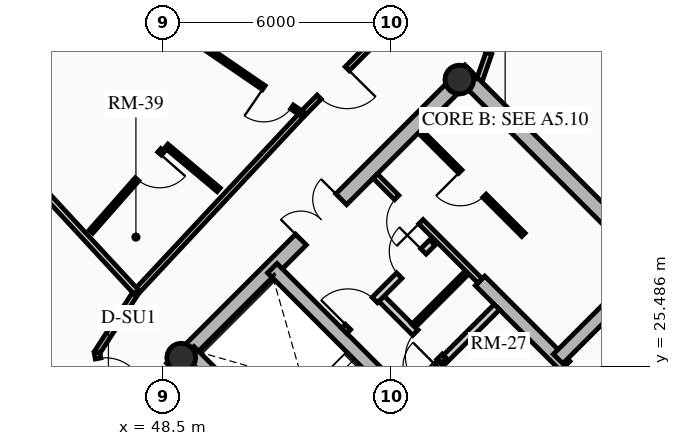
"""IFC4 building model, lengths in metres.
Left out: names, types, materials, properties, quantities, classifications, styles, units other than length and angle.
Written with IfcOpenShell. Run it as: python <this file> out.ifc"""

import sys

from ifc_helpers import new_model, si_unit, direction, frame, frame_2d, origin, origin_2d, place, context, subcontext, project, spatial, rectangle, hollow_circle, extrude, source, transform, mapped, element, fill, save


model = new_model("IFC4")
c1 = context("Model", 3, precision=1e-05, world=origin(), true_north=direction((0.0, 1.0)))
c2 = subcontext(c1, "Body", "Model", "MODEL_VIEW")
j1 = project(units=[si_unit("LENGTHUNIT", "METRE"), si_unit("PLANEANGLEUNIT", "RADIAN")], contexts=[c1])
p1 = place(None, origin())
s1 = spatial("IfcSite", under=j1, at=p1, CompositionType="ELEMENT")
p2 = place(p1, origin())
s2 = spatial("IfcBuilding", under=s1, at=p2, CompositionType="ELEMENT")
p3 = place(p2, frame((0.0, 0.0, 154.51)))
s3 = spatial("IfcBuildingStorey", under=s2, at=p3, CompositionType="ELEMENT", Elevation=154.51)
for number, where, z_axis, x_axis in (
    (1, (58.702, 15.732, 0.0), (0.0, 0.0, 1.0), (-0.707, 0.707, 0.0)),
    (2, (66.268, 23.298, 0.0), (0.0, 0.0, 1.0), (-0.707, 0.707, 0.0)),
):
    element("IfcWall", number, at=place(p3, frame(where, z_axis=z_axis, x_axis=x_axis)), inside=s3, PredefinedType="SHEAR", context=c2, shape_type="SweptSolid", body=[
        extrude(rectangle(XDim=14.1, YDim=0.4, at=frame_2d((7.05, 0.0))), origin(), (0.0, 0.0, 1.0), 2.91),
    ])
p4 = place(p3, frame((48.873, 25.561, 0.0), z_axis=(0.0, 0.0, 1.0), x_axis=(0.707106781187, 0.707106781187, 0.0)))
e3 = element("IfcWall", 3, at=p4, inside=s3, PredefinedType="SHEAR", context=c2, shape_type="SweptSolid", body=[
    extrude(rectangle(XDim=10.7, YDim=0.4, at=frame_2d((5.35, 0.0))), origin(), (0.0, 0.0, 1.0), 2.91),
])
m1 = source(origin(), c2, "Body", "SweptSolid", [
    extrude(rectangle(XDim=1.5, YDim=2.02, at=frame_2d((0.75, 1.01))), frame((0.0, 0.21, 0.0), z_axis=(0.0, -1.0, 0.0), x_axis=(1.0, 0.0, 0.0)), (0.0, 0.0, 1.0), 0.42),
])
p5 = place(p4, frame((4.6, 0.0, 0.0)))
e4 = element("IfcOpeningElement", 4, at=p5, cuts=e3, PredefinedType="OPENING", context=c2, shape_type="MappedRepresentation", body=[
    mapped(m1, transform((0.0, 0.0, 0.0), x_axis=(1.0, 0.0, 0.0), y_axis=(0.0, 1.0, 0.0), z_axis=(0.0, 0.0, 1.0), scale=1.0)),
])
p6 = place(p3, frame((61.06, 18.373, 0.0), z_axis=(0.0, 0.0, 1.0), x_axis=(-0.707106781187, 0.707106781187, 0.0)))
e5 = element("IfcWall", 5, at=p6, inside=s3, PredefinedType="SHEAR", context=c2, shape_type="SweptSolid", body=[
    extrude(rectangle(XDim=13.7, YDim=0.35, at=frame_2d((6.85, 0.0))), origin(), (0.0, 0.0, 1.0), 2.91),
])
m2 = source(origin(), c2, "Body", "SweptSolid", [
    extrude(rectangle(XDim=1.1, YDim=2.015, at=frame_2d((0.55, 1.007))), frame((0.0, 0.185, 0.0), z_axis=(0.0, -1.0, 0.0), x_axis=(1.0, 0.0, 0.0)), (0.0, 0.0, 1.0), 0.37),
])
p7 = place(p6, frame((4.85, 0.0, 0.0)))
e6 = element("IfcOpeningElement", 6, at=p7, cuts=e5, PredefinedType="OPENING", context=c2, shape_type="MappedRepresentation", body=[
    mapped(m2, transform((0.0, 0.0, 0.0), x_axis=(1.0, 0.0, 0.0), y_axis=(0.0, 1.0, 0.0), z_axis=(0.0, 0.0, 1.0), scale=1.0)),
])
p8 = place(p6, frame((0.625, 0.0, 0.0)))
e7 = element("IfcOpeningElement", 7, at=p8, cuts=e5, PredefinedType="OPENING", context=c2, shape_type="MappedRepresentation", body=[
    mapped(m2, transform((0.0, 0.0, 0.0), x_axis=(1.0, 0.0, 0.0), y_axis=(0.0, 1.0, 0.0), z_axis=(0.0, 0.0, 1.0), scale=1.0)),
])
p9 = place(p6, frame((2.625, 0.0, 0.0)))
e8 = element("IfcOpeningElement", 8, at=p9, cuts=e5, PredefinedType="OPENING", context=c2, shape_type="MappedRepresentation", body=[
    mapped(m2, transform((0.0, 0.0, 0.0), x_axis=(1.0, 0.0, 0.0), y_axis=(0.0, 1.0, 0.0), z_axis=(0.0, 0.0, 1.0), scale=1.0)),
])
m3 = source(origin(), c2, "Body", "SweptSolid", [
    extrude(rectangle(XDim=1.15, YDim=2.02, at=frame_2d((0.575, 1.01))), frame((0.0, 0.185, 0.0), z_axis=(0.0, -1.0, 0.0), x_axis=(1.0, 0.0, 0.0)), (0.0, 0.0, 1.0), 0.37),
])
p10 = place(p6, frame((7.27, 0.0, 0.0)))
e9 = element("IfcOpeningElement", 9, at=p10, cuts=e5, PredefinedType="OPENING", context=c2, shape_type="MappedRepresentation", body=[
    mapped(m3, transform((0.0, 0.0, 0.0), x_axis=(1.0, 0.0, 0.0), y_axis=(0.0, 1.0, 0.0), z_axis=(0.0, 0.0, 1.0), scale=1.0)),
])
p11 = place(p3, frame((63.627, 20.94, 0.0), z_axis=(0.0, 0.0, 1.0), x_axis=(-0.707119496762, 0.707094065383, 0.0)))
e10 = element("IfcWall", 10, at=p11, inside=s3, PredefinedType="SHEAR", context=c2, shape_type="SweptSolid", body=[
    extrude(rectangle(XDim=9.6, YDim=0.35, at=frame_2d((4.8, 0.0))), origin(), (0.0, 0.0, 1.0), 2.91),
])
p12 = place(p11, frame((5.28, 0.0, 0.0)))
e11 = element("IfcOpeningElement", 11, at=p12, cuts=e10, PredefinedType="OPENING", context=c2, shape_type="MappedRepresentation", body=[
    mapped(m3, transform((0.0, 0.0, 0.0), x_axis=(1.0, 0.0, 0.0), y_axis=(0.0, 1.0, 0.0), z_axis=(0.0, 0.0, 1.0), scale=1.0)),
])
p13 = place(p3, frame((53.922, 21.141, 0.0), z_axis=(0.0, 0.0, 1.0), x_axis=(-0.707106781187, 0.707106781187, 0.0)))
e12 = element("IfcWall", 12, at=p13, inside=s3, PredefinedType="SHEAR", context=c2, shape_type="SweptSolid", body=[
    extrude(rectangle(XDim=6.695, YDim=0.35, at=frame_2d((3.348, 0.0))), origin(), (0.0, 0.0, 1.0), 2.91),
])
p14 = place(p3, frame((58.893, 25.674, 0.0), z_axis=(0.0, 0.0, 1.0), x_axis=(0.707106781187, 0.707106781187, 0.0)))
e13 = element("IfcWall", 13, at=p14, inside=s3, PredefinedType="SHEAR", context=c2, shape_type="SweptSolid", body=[
    extrude(rectangle(XDim=3.285, YDim=0.35, at=frame_2d((1.643, 0.0))), origin(), (0.0, 0.0, 1.0), 2.91),
])
for number, where, z_axis, x_axis in (
    (14, (48.976, 25.706, 0.0), (0.0, 0.0, 1.0), (0.707, 0.707, 0.0)),
    (15, (56.294, 33.024, 0.0), (0.0, 0.0, 1.0), (0.707, 0.707, 0.0)),
):
    element("IfcColumn", number, at=place(p3, frame(where, z_axis=z_axis, x_axis=x_axis)), inside=s3, PredefinedType="COLUMN", context=c2, shape_type="SweptSolid", body=[
        extrude(hollow_circle(Radius=0.38, WallThickness=0.032, at=origin_2d()), origin(), (0.0, 0.0, 1.0), 2.91),
    ])
p15 = place(p3, frame((54.961, 24.719, 0.0), z_axis=(0.0, 0.0, 1.0), x_axis=(0.707106781187, 0.707106781187, 0.0)))
e16 = element("IfcWall", 16, at=p15, inside=s3, PredefinedType="PARTITIONING", context=c2, shape_type="SweptSolid", body=[
    extrude(rectangle(XDim=3.28, YDim=0.2, at=frame_2d((1.64, 0.0))), origin(), (0.0, 0.0, 1.0), 2.675),
])
m4 = source(origin(), c2, "Body", "SweptSolid", [
    extrude(rectangle(XDim=0.9, YDim=2.005, at=frame_2d((0.45, 1.002))), frame((0.0, 0.11, 0.0), z_axis=(0.0, -1.0, 0.0), x_axis=(1.0, 0.0, 0.0)), (0.0, 0.0, 1.0), 0.22),
])
p16 = place(p15, frame((0.16, 0.0, 0.0)))
e17 = element("IfcOpeningElement", 17, at=p16, cuts=e16, PredefinedType="OPENING", context=c2, shape_type="MappedRepresentation", body=[
    mapped(m4, transform((0.0, 0.0, 0.0), x_axis=(1.0, 0.0, 0.0), y_axis=(0.0, 1.0, 0.0), z_axis=(0.0, 0.0, 1.0), scale=1.0)),
])
p17 = place(p3, frame((55.874, 25.631, 0.0), z_axis=(0.0, 0.0, 1.0), x_axis=(-0.707157639372, 0.707055919343, 0.0)))
e18 = element("IfcWall", 18, at=p17, inside=s3, PredefinedType="PARTITIONING", context=c2, shape_type="SweptSolid", body=[
    extrude(rectangle(XDim=2.4, YDim=0.2, at=frame_2d((1.2, 0.0))), origin(), (0.0, 0.0, 1.0), 2.675),
])
p18 = place(p17, frame((0.14, 0.0, 0.0)))
e19 = element("IfcOpeningElement", 19, at=p18, cuts=e18, PredefinedType="OPENING", context=c2, shape_type="MappedRepresentation", body=[
    mapped(m4, transform((0.0, 0.0, 0.0), x_axis=(1.0, 0.0, 0.0), y_axis=(0.0, 1.0, 0.0), z_axis=(0.0, 0.0, 1.0), scale=1.0)),
])
p19 = place(p3, frame((53.264, 26.416, 0.0), z_axis=(0.0, 0.0, 1.0), x_axis=(0.707106781187, 0.707106781187, 0.0)))
e20 = element("IfcWall", 20, at=p19, inside=s3, PredefinedType="PARTITIONING", context=c2, shape_type="SweptSolid", body=[
    extrude(rectangle(XDim=3.28, YDim=0.2, at=frame_2d((1.64, 0.0))), origin(), (0.0, 0.0, 1.0), 2.675),
])
m5 = source(origin(), c2, "Body", "SweptSolid", [
    extrude(rectangle(XDim=1.0, YDim=2.015, at=frame_2d((0.5, 1.007))), frame((0.0, 0.11, 0.0), z_axis=(0.0, -1.0, 0.0), x_axis=(1.0, 0.0, 0.0)), (0.0, 0.0, 1.0), 0.22),
])
p20 = place(p19, frame((0.14, 0.0, 0.0)))
e21 = element("IfcOpeningElement", 21, at=p20, cuts=e20, PredefinedType="OPENING", context=c2, shape_type="MappedRepresentation", body=[
    mapped(m5, transform((0.0, 0.0, 0.0), x_axis=(1.0, 0.0, 0.0), y_axis=(0.0, 1.0, 0.0), z_axis=(0.0, 0.0, 1.0), scale=1.0)),
])
p21 = place(p19, frame((2.05, 0.0, 0.0)))
e22 = element("IfcOpeningElement", 22, at=p21, cuts=e20, PredefinedType="OPENING", context=c2, shape_type="MappedRepresentation", body=[
    mapped(m4, transform((0.0, 0.0, 0.0), x_axis=(1.0, 0.0, 0.0), y_axis=(0.0, 1.0, 0.0), z_axis=(0.0, 0.0, 1.0), scale=1.0)),
])
p22 = place(p3, frame((55.089, 26.543, 0.0), z_axis=(0.0, 0.0, 1.0), x_axis=(0.707106781187, 0.707106781187, 0.0)))
e23 = element("IfcWall", 23, at=p22, inside=s3, PredefinedType="PARTITIONING", context=c2, shape_type="SweptSolid", body=[
    extrude(rectangle(XDim=1.88, YDim=0.125, at=frame_2d((0.94, 0.0))), origin(), (0.0, 0.0, 1.0), 2.675),
])
p23 = place(p3, frame((56.839, 27.728, 0.0), z_axis=(0.0, 0.0, 1.0), x_axis=(-0.707106781187, 0.707106781187, 0.0)))
e24 = element("IfcWall", 24, at=p23, inside=s3, PredefinedType="PARTITIONING", context=c2, shape_type="SweptSolid", body=[
    extrude(rectangle(XDim=3.9, YDim=0.16, at=frame_2d((1.95, 0.0))), origin(), (0.0, 0.0, 1.0), 2.675),
])
m6 = source(origin(), c2, "Body", "SweptSolid", [
    extrude(rectangle(XDim=0.9, YDim=2.005, at=frame_2d((0.45, 1.002))), frame((0.0, 0.09, 0.0), z_axis=(0.0, -1.0, 0.0), x_axis=(1.0, 0.0, 0.0)), (0.0, 0.0, 1.0), 0.18),
])
p24 = place(p23, frame((2.2, 0.0, 0.0)))
e25 = element("IfcOpeningElement", 25, at=p24, cuts=e24, PredefinedType="OPENING", context=c2, shape_type="MappedRepresentation", body=[
    mapped(m6, transform((0.0, 0.0, 0.0), x_axis=(1.0, 0.0, 0.0), y_axis=(0.0, 1.0, 0.0), z_axis=(0.0, 0.0, 1.0), scale=1.0)),
])
p25 = place(p3, frame((57.981, 28.941, 0.0), z_axis=(0.0, 0.0, 1.0), x_axis=(-0.707074823725, 0.707138737204, 0.0)))
e26 = element("IfcWall", 26, at=p25, inside=s3, PredefinedType="PARTITIONING", context=c2, shape_type="SweptSolid", body=[
    extrude(rectangle(XDim=3.82, YDim=0.125, at=frame_2d((1.91, 0.0))), origin(), (0.0, 0.0, 1.0), 2.675),
])
m7 = source(origin(), c2, "Body", "SweptSolid", [
    extrude(rectangle(XDim=0.9, YDim=2.005, at=frame_2d((0.45, 1.002))), frame((0.0, 0.073, 0.0), z_axis=(0.0, -1.0, 0.0), x_axis=(1.0, 0.0, 0.0)), (0.0, 0.0, 1.0), 0.145),
])
p26 = place(p25, frame((1.45, 0.0, 0.0)))
e27 = element("IfcOpeningElement", 27, at=p26, cuts=e26, PredefinedType="OPENING", context=c2, shape_type="MappedRepresentation", body=[
    mapped(m7, transform((0.0, 0.0, 0.0), x_axis=(1.0, 0.0, 0.0), y_axis=(0.0, 1.0, 0.0), z_axis=(0.0, 0.0, 1.0), scale=1.0)),
])
p27 = place(p3, frame((54.501, 34.479, 0.0), z_axis=(0.0, 0.0, 1.0), x_axis=(-0.70346073929, -0.710734119258, 0.0)))
e28 = element("IfcWall", 28, at=p27, inside=s3, PredefinedType="PARTITIONING", context=c2, shape_type="SweptSolid", body=[
    extrude(rectangle(XDim=3.323, YDim=0.15, at=frame_2d((1.662, 0.0))), origin(), (0.0, 0.0, 1.0), 2.245),
])
m8 = source(origin(), c2, "Body", "SweptSolid", [
    extrude(rectangle(XDim=1.05, YDim=2.015, at=frame_2d((0.525, 1.007))), frame((0.0, 0.085, 0.0), z_axis=(0.0, -1.0, 0.0), x_axis=(1.0, 0.0, 0.0)), (0.0, 0.0, 1.0), 0.17),
])
p28 = place(p27, frame((1.645, 0.0, 0.0)))
e29 = element("IfcOpeningElement", 29, at=p28, cuts=e28, PredefinedType="OPENING", context=c2, shape_type="MappedRepresentation", body=[
    mapped(m8, transform((0.0, 0.0, 0.0), x_axis=(1.0, 0.0, 0.0), y_axis=(0.0, 1.0, 0.0), z_axis=(0.0, 0.0, 1.0), scale=1.0)),
])
p29 = place(p3, frame((52.163, 32.117, 0.0), z_axis=(0.0, 0.0, 1.0), x_axis=(-0.682485296115, -0.730899323154, 0.0)))
e30 = element("IfcWall", 30, at=p29, inside=s3, PredefinedType="PARTITIONING", context=c2, shape_type="SweptSolid", body=[
    extrude(rectangle(XDim=6.404, YDim=0.15, at=frame_2d((3.202, 0.0))), origin(), (0.0, 0.0, 1.0), 2.245),
])
p30 = place(p3, frame((47.792, 27.436, 0.0), z_axis=(0.0, 0.0, 1.0), x_axis=(-0.543086162542, -0.839676973637, 0.0)))
e31 = element("IfcWall", 31, at=p30, inside=s3, PredefinedType="PARTITIONING", context=c2, shape_type="SweptSolid", body=[
    extrude(rectangle(XDim=1.901, YDim=0.15, at=frame_2d((0.95, 0.0))), origin(), (0.0, 0.0, 1.0), 2.245),
])
p31 = place(p3, frame((46.76, 25.84, 0.0), z_axis=(0.0, 0.0, 1.0), x_axis=(0.181230731673, -0.983440604153, 0.0)))
e32 = element("IfcWall", 32, at=p31, inside=s3, PredefinedType="PARTITIONING", context=c2, shape_type="SweptSolid", body=[
    extrude(rectangle(XDim=1.365, YDim=0.15, at=frame_2d((0.682, 0.0))), origin(), (0.0, 0.0, 1.0), 2.245),
])
p32 = place(p31, frame((0.157, 0.0, 0.0)))
e33 = element("IfcOpeningElement", 33, at=p32, cuts=e32, PredefinedType="OPENING", context=c2, shape_type="MappedRepresentation", body=[
    mapped(m8, transform((0.0, 0.0, 0.0), x_axis=(1.0, 0.0, 0.0), y_axis=(0.0, 1.0, 0.0), z_axis=(0.0, 0.0, 1.0), scale=1.0)),
])
p33 = place(p3, frame((47.792, 27.436, 0.0), z_axis=(0.0, 0.0, 1.0), x_axis=(-0.679077160958, 0.734066897132, 0.0)))
e34 = element("IfcWall", 34, at=p33, inside=s3, PredefinedType="PARTITIONING", context=c2, shape_type="SweptSolid", body=[
    extrude(rectangle(XDim=7.947, YDim=0.16, at=frame_2d((3.974, 0.0))), origin(), (0.0, 0.0, 1.0), 2.245),
])
p34 = place(p3, frame((56.828, 33.021, 0.0), z_axis=(0.0, 0.0, 1.0), x_axis=(0.328682472103, 0.944440486496, 0.0)))
e35 = element("IfcWall", 35, at=p34, inside=s3, PredefinedType="PARTITIONING", context=c2, shape_type="SweptSolid", body=[
    extrude(rectangle(XDim=1.989, YDim=0.16, at=frame_2d((0.995, 0.0))), origin(), (0.0, 0.0, 1.0), 2.245),
])
m9 = source(origin(), c2, "Body", "SweptSolid", [
    extrude(rectangle(XDim=1.05, YDim=2.015, at=frame_2d((0.525, 1.007))), frame((0.0, 0.09, 0.0), z_axis=(0.0, -1.0, 0.0), x_axis=(1.0, 0.0, 0.0)), (0.0, 0.0, 1.0), 0.18),
])
p35 = place(p34, frame((0.739, 0.0, 0.0)))
e36 = element("IfcOpeningElement", 36, at=p35, cuts=e35, PredefinedType="OPENING", context=c2, shape_type="MappedRepresentation", body=[
    mapped(m9, transform((0.0, 0.0, 0.0), x_axis=(1.0, 0.0, 0.0), y_axis=(0.0, 1.0, 0.0), z_axis=(0.0, 0.0, 1.0), scale=1.0)),
])
p36 = place(p3, frame((52.163, 32.117, 0.0), z_axis=(0.0, 0.0, 1.0), x_axis=(-0.825403853282, 0.564542716707, 0.0)))
e37 = element("IfcWall", 37, at=p36, inside=s3, PredefinedType="PARTITIONING", context=c2, shape_type="SweptSolid", body=[
    extrude(rectangle(XDim=8.74, YDim=0.125, at=frame_2d((4.37, 0.0))), origin(), (0.0, 0.0, 1.0), 2.245),
])
p37 = place(p36, frame((0.33, 0.0, 0.0)))
e38 = element("IfcOpeningElement", 38, at=p37, cuts=e37, PredefinedType="OPENING", context=c2, shape_type="MappedRepresentation", body=[
    mapped(m7, transform((0.0, 0.0, 0.0), x_axis=(1.0, 0.0, 0.0), y_axis=(0.0, 1.0, 0.0), z_axis=(0.0, 0.0, 1.0), scale=1.0)),
])
p38 = place(p3, frame((49.961, 30.124, 0.0), z_axis=(0.0, 0.0, 1.0), x_axis=(-0.766210982885, 0.64258908309, 0.0)))
e39 = element("IfcWall", 39, at=p38, inside=s3, PredefinedType="PARTITIONING", context=c2, shape_type="SweptSolid", body=[
    extrude(rectangle(XDim=1.795, YDim=0.125, at=frame_2d((0.897, 0.0))), origin(), (0.0, 0.0, 1.0), 2.675),
])
p39 = place(p3, frame((48.488, 31.166, 0.0), z_axis=(0.0, 0.0, 1.0), x_axis=(-0.660635615229, -0.750706722956, 0.0)))
e40 = element("IfcWall", 40, at=p39, inside=s3, PredefinedType="PARTITIONING", context=c2, shape_type="SweptSolid", body=[
    extrude(rectangle(XDim=2.852, YDim=0.125, at=frame_2d((1.426, 0.0))), origin(), (0.0, 0.0, 1.0), 2.245),
])
p40 = place(p39, frame((0.12, 0.0, 0.0)))
e41 = element("IfcOpeningElement", 41, at=p40, cuts=e40, PredefinedType="OPENING", context=c2, shape_type="MappedRepresentation", body=[
    mapped(m7, transform((0.0, 0.0, 0.0), x_axis=(1.0, 0.0, 0.0), y_axis=(0.0, 1.0, 0.0), z_axis=(0.0, 0.0, 1.0), scale=1.0)),
])
m10 = source(origin(), c2, "Body", "SweptSolid", [
    extrude(rectangle(XDim=1.15, YDim=2.02, at=frame_2d((0.575, 1.01))), frame((0.0, 0.025, 0.0), z_axis=(0.0, -1.0, 0.0), x_axis=(1.0, 0.0, 0.0)), (0.0, 0.0, 1.0), 0.05),
])
p41 = place(p12, origin())
e42 = element("IfcDoor", 42, at=p41, inside=s3, OperationType="SINGLE_SWING_LEFT", PredefinedType="DOOR", context=c2, shape_type="MappedRepresentation", body=[
    mapped(m10, transform((0.0, 0.0, 0.0), x_axis=(1.0, 0.0, 0.0), y_axis=(0.0, 1.0, 0.0), z_axis=(0.0, 0.0, 1.0), scale=1.0)),
])
fill(e11, e42)
m11 = source(origin(), c2, "Body", "SweptSolid", [
    extrude(rectangle(XDim=1.5, YDim=2.02, at=frame_2d((0.75, 1.01))), frame((0.0, 0.025, 0.0), z_axis=(0.0, -1.0, 0.0), x_axis=(1.0, 0.0, 0.0)), (0.0, 0.0, 1.0), 0.05),
])
p42 = place(p5, origin())
e43 = element("IfcDoor", 43, at=p42, inside=s3, OperationType="DOUBLE_DOOR_SINGLE_SWING", PredefinedType="DOOR", context=c2, shape_type="MappedRepresentation", body=[
    mapped(m11, transform((0.0, 0.0, 0.0), x_axis=(1.0, 0.0, 0.0), y_axis=(0.0, 1.0, 0.0), z_axis=(0.0, 0.0, 1.0), scale=1.0)),
])
fill(e4, e43)
m12 = source(origin(), c2, "Body", "SweptSolid", [
    extrude(rectangle(XDim=0.9, YDim=2.005, at=frame_2d((0.45, 1.002))), frame((0.0, 0.025, 0.0), z_axis=(0.0, -1.0, 0.0), x_axis=(1.0, 0.0, 0.0)), (0.0, 0.0, 1.0), 0.05),
])
p43 = place(p16, origin())
e44 = element("IfcDoor", 44, at=p43, inside=s3, OperationType="SINGLE_SWING_RIGHT", PredefinedType="DOOR", context=c2, shape_type="MappedRepresentation", body=[
    mapped(m12, transform((0.0, 0.0, 0.0), x_axis=(1.0, 0.0, 0.0), y_axis=(0.0, 1.0, 0.0), z_axis=(0.0, 0.0, 1.0), scale=1.0)),
])
fill(e17, e44)
m13 = source(origin(), c2, "Body", "SweptSolid", [
    extrude(rectangle(XDim=1.0, YDim=2.015, at=frame_2d((0.5, 1.007))), frame((0.0, 0.025, 0.0), z_axis=(0.0, -1.0, 0.0), x_axis=(1.0, 0.0, 0.0)), (0.0, 0.0, 1.0), 0.05),
])
p44 = place(p20, origin())
e45 = element("IfcDoor", 45, at=p44, inside=s3, OperationType="SINGLE_SWING_LEFT", PredefinedType="DOOR", context=c2, shape_type="MappedRepresentation", body=[
    mapped(m13, transform((0.0, 0.0, 0.0), x_axis=(1.0, 0.0, 0.0), y_axis=(0.0, 1.0, 0.0), z_axis=(0.0, 0.0, 1.0), scale=1.0)),
])
fill(e21, e45)
p45 = place(p18, origin())
e46 = element("IfcDoor", 46, at=p45, inside=s3, OperationType="SINGLE_SWING_LEFT", PredefinedType="DOOR", context=c2, shape_type="MappedRepresentation", body=[
    mapped(m12, transform((0.0, 0.0, 0.0), x_axis=(1.0, 0.0, 0.0), y_axis=(0.0, 1.0, 0.0), z_axis=(0.0, 0.0, 1.0), scale=1.0)),
])
fill(e19, e46)
p46 = place(p21, origin())
e47 = element("IfcDoor", 47, at=p46, inside=s3, OperationType="SINGLE_SWING_RIGHT", PredefinedType="DOOR", context=c2, shape_type="MappedRepresentation", body=[
    mapped(m12, transform((0.0, 0.0, 0.0), x_axis=(1.0, 0.0, 0.0), y_axis=(0.0, 1.0, 0.0), z_axis=(0.0, 0.0, 1.0), scale=1.0)),
])
fill(e22, e47)
p47 = place(p24, origin())
e48 = element("IfcDoor", 48, at=p47, inside=s3, OperationType="SINGLE_SWING_LEFT", PredefinedType="DOOR", context=c2, shape_type="MappedRepresentation", body=[
    mapped(m12, transform((0.0, 0.0, 0.0), x_axis=(1.0, 0.0, 0.0), y_axis=(0.0, 1.0, 0.0), z_axis=(0.0, 0.0, 1.0), scale=1.0)),
])
fill(e25, e48)
p48 = place(p26, origin())
e49 = element("IfcDoor", 49, at=p48, inside=s3, OperationType="SINGLE_SWING_RIGHT", PredefinedType="DOOR", context=c2, shape_type="MappedRepresentation", body=[
    mapped(m12, transform((0.0, 0.0, 0.0), x_axis=(1.0, 0.0, 0.0), y_axis=(0.0, 1.0, 0.0), z_axis=(0.0, 0.0, 1.0), scale=1.0)),
])
fill(e27, e49)
m14 = source(origin(), c2, "Body", "SweptSolid", [
    extrude(rectangle(XDim=1.05, YDim=2.015, at=frame_2d((0.525, 1.007))), frame((0.0, 0.025, 0.0), z_axis=(0.0, -1.0, 0.0), x_axis=(1.0, 0.0, 0.0)), (0.0, 0.0, 1.0), 0.05),
])
p49 = place(p35, origin())
e50 = element("IfcDoor", 50, at=p49, inside=s3, OperationType="SINGLE_SWING_LEFT", PredefinedType="DOOR", context=c2, shape_type="MappedRepresentation", body=[
    mapped(m14, transform((0.0, 0.0, 0.0), x_axis=(1.0, 0.0, 0.0), y_axis=(0.0, 1.0, 0.0), z_axis=(0.0, 0.0, 1.0), scale=1.0)),
])
fill(e36, e50)
p50 = place(p28, origin())
e51 = element("IfcDoor", 51, at=p50, inside=s3, OperationType="SINGLE_SWING_LEFT", PredefinedType="DOOR", context=c2, shape_type="MappedRepresentation", body=[
    mapped(m14, transform((0.0, 0.0, 0.0), x_axis=(1.0, 0.0, 0.0), y_axis=(0.0, 1.0, 0.0), z_axis=(0.0, 0.0, 1.0), scale=1.0)),
])
fill(e29, e51)
p51 = place(p37, origin())
e52 = element("IfcDoor", 52, at=p51, inside=s3, OperationType="SINGLE_SWING_RIGHT", PredefinedType="DOOR", context=c2, shape_type="MappedRepresentation", body=[
    mapped(m12, transform((0.0, 0.0, 0.0), x_axis=(1.0, 0.0, 0.0), y_axis=(0.0, 1.0, 0.0), z_axis=(0.0, 0.0, 1.0), scale=1.0)),
])
fill(e38, e52)
p52 = place(p40, origin())
e53 = element("IfcDoor", 53, at=p52, inside=s3, OperationType="SINGLE_SWING_LEFT", PredefinedType="DOOR", context=c2, shape_type="MappedRepresentation", body=[
    mapped(m12, transform((0.0, 0.0, 0.0), x_axis=(1.0, 0.0, 0.0), y_axis=(0.0, 1.0, 0.0), z_axis=(0.0, 0.0, 1.0), scale=1.0)),
])
fill(e41, e53)
p53 = place(p32, origin())
e54 = element("IfcDoor", 54, at=p53, inside=s3, OperationType="SINGLE_SWING_RIGHT", PredefinedType="DOOR", context=c2, shape_type="MappedRepresentation", body=[
    mapped(m14, transform((0.0, 0.0, 0.0), x_axis=(1.0, 0.0, 0.0), y_axis=(0.0, 1.0, 0.0), z_axis=(0.0, 0.0, 1.0), scale=1.0)),
])
fill(e33, e54)
save(model, sys.argv[1])
